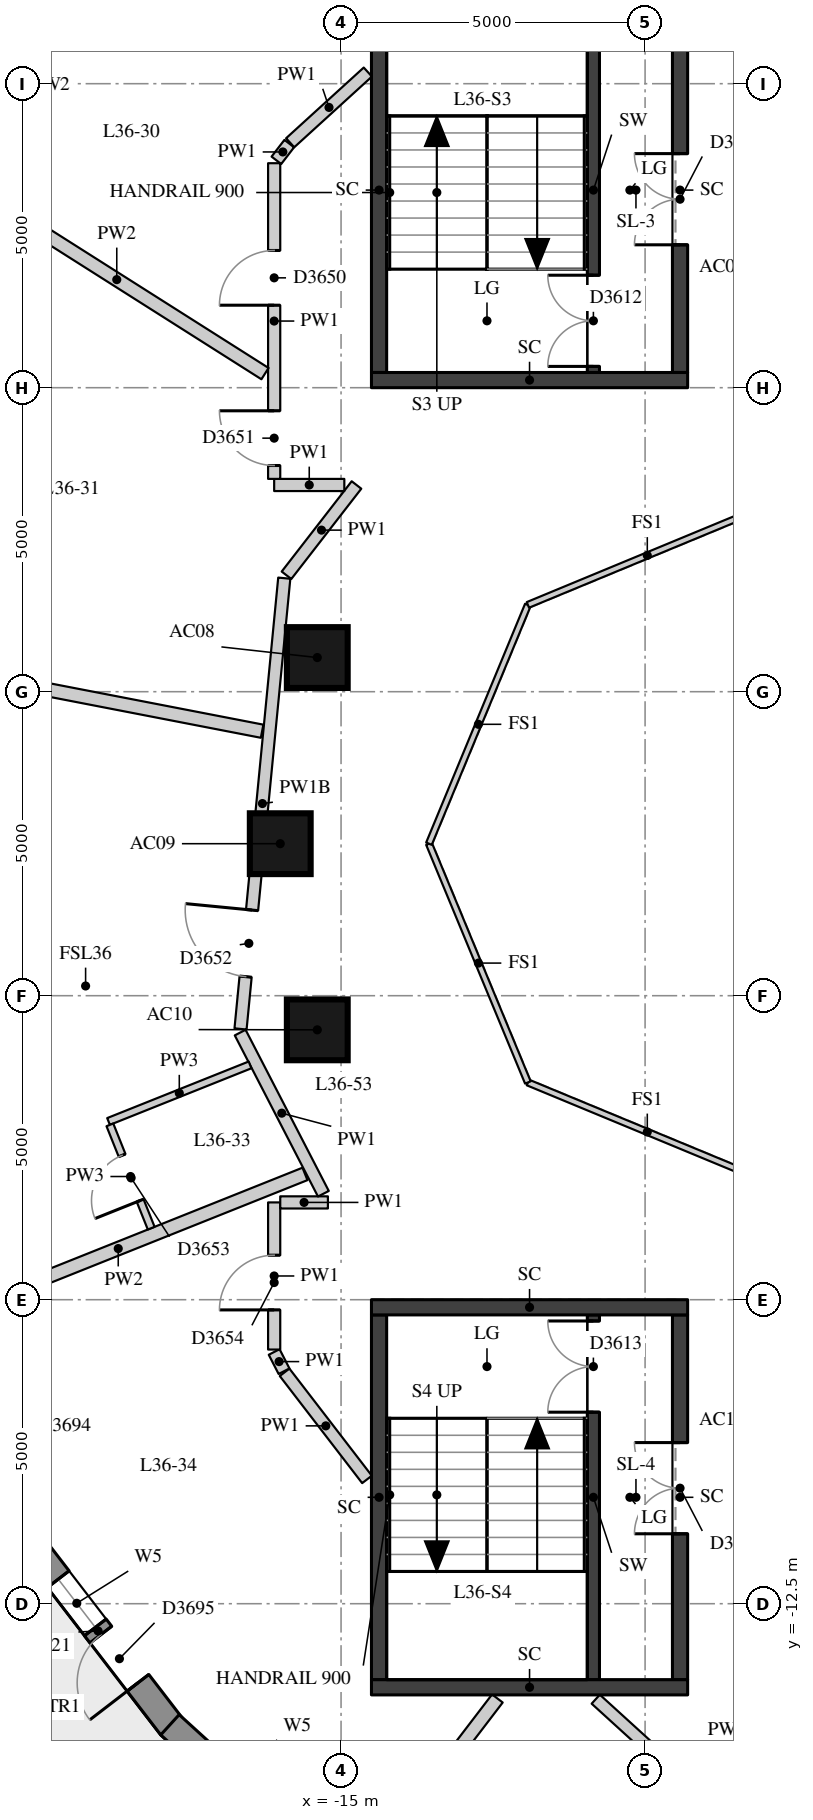
"""IFC4 building model, lengths in metres.
Left out: names, types, materials, properties, quantities, classifications, styles, units other than length and angle.
Written with IfcOpenShell. Run it as: python <this file> out.ifc"""

import sys

from ifc_helpers import new_model, si_unit, direction, frame, frame_2d, origin, origin_2d, place, context, subcontext, project, spatial, rectangle, extrude, element, fill, save


model = new_model("IFC4")
c1 = context("Model", 3, precision=1e-05, world=origin(), true_north=direction((0.0, 1.0)))
c2 = subcontext(c1, "Body", "Model", "MODEL_VIEW")
j1 = project(units=[si_unit("LENGTHUNIT", "METRE"), si_unit("PLANEANGLEUNIT", "RADIAN")], contexts=[c1])
p1 = place(None, origin())
s1 = spatial("IfcSite", under=j1, at=p1, CompositionType="ELEMENT")
p2 = place(p1, origin())
s2 = spatial("IfcBuilding", under=s1, at=p2, CompositionType="ELEMENT")
p3 = place(p2, frame((0.0, 0.0, 128.5)))
s3 = spatial("IfcBuildingStorey", under=s2, at=p3, CompositionType="ELEMENT", Elevation=128.5)
for number, where, z_axis, x_axis in (
    (1, (-15.391, 3.062, 0.0), (0.0, 0.0, 1.0), (1.0, 0.0, 0.0)),
    (2, (-16.0, 0.0, 0.0), (0.0, 0.0, 1.0), (1.0, 0.0, 0.0)),
    (3, (-15.391, -3.062, 0.0), (0.0, 0.0, 1.0), (1.0, 0.0, 0.0)),
):
    element("IfcColumn", number, at=place(p3, frame(where, z_axis=z_axis, x_axis=x_axis)), inside=s3, PredefinedType="COLUMN", context=c2, shape_type="SweptSolid", body=[
        extrude(rectangle(XDim=1.0, YDim=1.0, at=origin_2d()), origin(), (0.0, 0.0, 1.0), 3.3),
    ])
p4 = place(p3, frame((-19.835, 14.575, 0.0), z_axis=(0.0, 0.0, 1.0), x_axis=(-0.610693945156, -0.791866721961, 0.0)))
e4 = element("IfcWall", 4, at=p4, inside=s3, PredefinedType="SOLIDWALL", context=c2, shape_type="SweptSolid", body=[
    extrude(rectangle(XDim=3.395, YDim=0.45, at=frame_2d((1.697, 0.0))), origin(), (0.0, 0.0, 1.0), 3.02),
])
p5 = place(p4, frame((0.697, 0.0, 0.4)))
e5 = element("IfcOpeningElement", 5, at=p5, cuts=e4, PredefinedType="OPENING", context=c2, shape_type="SweptSolid", body=[
    extrude(rectangle(XDim=2.0, YDim=1.75, at=frame_2d((1.0, 0.875))), frame((0.0, 0.235, 0.0), z_axis=(0.0, -1.0, 0.0), x_axis=(1.0, 0.0, 0.0)), (0.0, 0.0, 1.0), 0.47),
])
p6 = place(p3, frame((-20.204, -11.377, 0.0), z_axis=(0.0, 0.0, 1.0), x_axis=(0.609698858135, -0.792633144897, 0.0)))
e6 = element("IfcWall", 6, at=p6, inside=s3, PredefinedType="SOLIDWALL", context=c2, shape_type="SweptSolid", body=[
    extrude(rectangle(XDim=3.965, YDim=0.45, at=frame_2d((1.982, 0.0))), origin(), (0.0, 0.0, 1.0), 3.02),
])
p7 = place(p6, frame((0.907, 0.0, 0.4)))
e7 = element("IfcOpeningElement", 7, at=p7, cuts=e6, PredefinedType="OPENING", context=c2, shape_type="SweptSolid", body=[
    extrude(rectangle(XDim=1.0, YDim=1.75, at=frame_2d((0.5, 0.875))), frame((0.0, 0.235, 0.0), z_axis=(0.0, -1.0, 0.0), x_axis=(1.0, 0.0, 0.0)), (0.0, 0.0, 1.0), 0.47),
])
p8 = place(p6, frame((2.058, 0.0, 0.0)))
e8 = element("IfcOpeningElement", 8, at=p8, cuts=e6, PredefinedType="OPENING", context=c2, shape_type="SweptSolid", body=[
    extrude(rectangle(XDim=1.0, YDim=2.15, at=frame_2d((0.5, 1.075))), frame((0.0, 0.235, 0.0), z_axis=(0.0, -1.0, 0.0), x_axis=(1.0, 0.0, 0.0)), (0.0, 0.0, 1.0), 0.47),
])
p9 = place(p3, frame((-17.814, -14.491, 0.0), z_axis=(0.0, 0.0, 1.0), x_axis=(0.73951517403, -0.673139886933, 0.0)))
e9 = element("IfcWall", 9, at=p9, inside=s3, PredefinedType="SOLIDWALL", context=c2, shape_type="SweptSolid", body=[
    extrude(rectangle(XDim=4.031, YDim=0.45, at=frame_2d((2.016, 0.0))), origin(), (0.0, 0.0, 1.0), 3.02),
])
p10 = place(p9, frame((0.941, 0.0, 0.4)))
e10 = element("IfcOpeningElement", 10, at=p10, cuts=e9, PredefinedType="OPENING", context=c2, shape_type="SweptSolid", body=[
    extrude(rectangle(XDim=1.0, YDim=1.75, at=frame_2d((0.5, 0.875))), frame((0.0, 0.235, 0.0), z_axis=(0.0, -1.0, 0.0), x_axis=(1.0, 0.0, 0.0)), (0.0, 0.0, 1.0), 0.47),
])
p11 = place(p9, frame((2.091, 0.0, 0.0)))
e11 = element("IfcOpeningElement", 11, at=p11, cuts=e9, PredefinedType="OPENING", context=c2, shape_type="SweptSolid", body=[
    extrude(rectangle(XDim=1.0, YDim=2.15, at=frame_2d((0.5, 1.075))), frame((0.0, 0.235, 0.0), z_axis=(0.0, -1.0, 0.0), x_axis=(1.0, 0.0, 0.0)), (0.0, 0.0, 1.0), 0.47),
])
p12 = place(p3, frame((-10.85, 7.75, 0.0), z_axis=(0.0, 0.0, 1.0), x_axis=(0.0, 1.0, 0.0)))
e12 = element("IfcWall", 12, at=p12, inside=s3, PredefinedType="SHEAR", context=c2, shape_type="SweptSolid", body=[
    extrude(rectangle(XDim=6.0, YDim=0.2, at=frame_2d((3.0, 0.0))), origin(), (0.0, 0.0, 1.0), 3.02),
])
p13 = place(p12, frame((0.1, 0.0, 0.0)))
e13 = element("IfcOpeningElement", 13, at=p13, cuts=e12, PredefinedType="OPENING", context=c2, shape_type="SweptSolid", body=[
    extrude(rectangle(XDim=1.5, YDim=2.1, at=frame_2d((0.75, 1.05))), frame((0.0, 0.11, 0.0), z_axis=(0.0, -1.0, 0.0), x_axis=(1.0, 0.0, 0.0)), (0.0, 0.0, 1.0), 0.22),
])
p14 = place(p3, frame((-10.85, -13.75, 0.0), z_axis=(0.0, 0.0, 1.0), x_axis=(0.0, 1.0, 0.0)))
e14 = element("IfcWall", 14, at=p14, inside=s3, PredefinedType="SHEAR", context=c2, shape_type="SweptSolid", body=[
    extrude(rectangle(XDim=6.0, YDim=0.2, at=frame_2d((3.0, 0.0))), origin(), (0.0, 0.0, 1.0), 3.02),
])
p15 = place(p14, frame((4.4, 0.0, 0.0)))
e15 = element("IfcOpeningElement", 15, at=p15, cuts=e14, PredefinedType="OPENING", context=c2, shape_type="SweptSolid", body=[
    extrude(rectangle(XDim=1.5, YDim=2.1, at=frame_2d((0.75, 1.05))), frame((0.0, 0.11, 0.0), z_axis=(0.0, -1.0, 0.0), x_axis=(1.0, 0.0, 0.0)), (0.0, 0.0, 1.0), 0.22),
])
p16 = place(p3, frame((-14.375, 7.75, -0.28), z_axis=(0.0, 0.0, 1.0), x_axis=(0.0, 1.0, 0.0)))
e16 = element("IfcWall", 16, at=p16, inside=s3, PredefinedType="SHEAR", context=c2, shape_type="SweptSolid", body=[
    extrude(rectangle(XDim=6.0, YDim=0.25, at=frame_2d((3.0, 0.0))), origin(), (0.0, 0.0, 1.0), 3.3),
])
p17 = place(p3, frame((-9.425, 7.75, -0.28), z_axis=(0.0, 0.0, 1.0), x_axis=(0.0, 1.0, 0.0)))
e17 = element("IfcWall", 17, at=p17, inside=s3, PredefinedType="SHEAR", context=c2, shape_type="SweptSolid", body=[
    extrude(rectangle(XDim=6.0, YDim=0.25, at=frame_2d((3.0, 0.0))), origin(), (0.0, 0.0, 1.0), 3.3),
])
p18 = place(p17, frame((2.1, 0.0, 0.28)))
e18 = element("IfcOpeningElement", 18, at=p18, cuts=e17, PredefinedType="OPENING", context=c2, shape_type="SweptSolid", body=[
    extrude(rectangle(XDim=1.5, YDim=2.1, at=frame_2d((0.75, 1.05))), frame((0.0, 0.135, 0.0), z_axis=(0.0, -1.0, 0.0), x_axis=(1.0, 0.0, 0.0)), (0.0, 0.0, 1.0), 0.27),
])
p19 = place(p3, frame((-14.5, 7.625, -0.28), z_axis=(0.0, 0.0, 1.0), x_axis=(1.0, 0.0, 0.0)))
e19 = element("IfcWall", 19, at=p19, inside=s3, PredefinedType="SHEAR", context=c2, shape_type="SweptSolid", body=[
    extrude(rectangle(XDim=5.2, YDim=0.25, at=frame_2d((2.6, 0.0))), origin(), (0.0, 0.0, 1.0), 3.3),
])
p20 = place(p3, frame((-14.375, -13.75, -0.28), z_axis=(0.0, 0.0, 1.0), x_axis=(0.0, 1.0, 0.0)))
e20 = element("IfcWall", 20, at=p20, inside=s3, PredefinedType="SHEAR", context=c2, shape_type="SweptSolid", body=[
    extrude(rectangle(XDim=6.0, YDim=0.25, at=frame_2d((3.0, 0.0))), origin(), (0.0, 0.0, 1.0), 3.3),
])
p21 = place(p3, frame((-9.425, -13.75, -0.28), z_axis=(0.0, 0.0, 1.0), x_axis=(0.0, 1.0, 0.0)))
e21 = element("IfcWall", 21, at=p21, inside=s3, PredefinedType="SHEAR", context=c2, shape_type="SweptSolid", body=[
    extrude(rectangle(XDim=6.0, YDim=0.25, at=frame_2d((3.0, 0.0))), origin(), (0.0, 0.0, 1.0), 3.3),
])
p22 = place(p21, frame((2.4, 0.0, 0.28)))
e22 = element("IfcOpeningElement", 22, at=p22, cuts=e21, PredefinedType="OPENING", context=c2, shape_type="SweptSolid", body=[
    extrude(rectangle(XDim=1.5, YDim=2.1, at=frame_2d((0.75, 1.05))), frame((0.0, 0.135, 0.0), z_axis=(0.0, -1.0, 0.0), x_axis=(1.0, 0.0, 0.0)), (0.0, 0.0, 1.0), 0.27),
])
for number, where, z_axis, x_axis in (
    (23, (-14.5, -7.625, -0.28), (0.0, 0.0, 1.0), (1.0, 0.0, 0.0)),
    (24, (-14.5, -13.875, -0.28), (0.0, 0.0, 1.0), (1.0, 0.0, 0.0)),
):
    element("IfcWall", number, at=place(p3, frame(where, z_axis=z_axis, x_axis=x_axis)), inside=s3, PredefinedType="SHEAR", context=c2, shape_type="SweptSolid", body=[
        extrude(rectangle(XDim=5.2, YDim=0.25, at=frame_2d((2.6, 0.0))), origin(), (0.0, 0.0, 1.0), 3.3),
    ])
p23 = place(p3, frame((-14.573, -10.456, 0.0), z_axis=(0.0, 0.0, 1.0), x_axis=(-0.60967360535, 0.792652568872, 0.0)))
e25 = element("IfcWall", 25, at=p23, inside=s3, PredefinedType="PARTITIONING", context=c2, shape_type="SweptSolid", body=[
    extrude(rectangle(XDim=2.223, YDim=0.2, at=frame_2d((1.111, 0.0))), origin(), (0.0, 0.0, 1.0), 3.02),
])
p24 = place(p3, frame((-15.938, -8.676, 0.0), z_axis=(0.0, 0.0, 1.0), x_axis=(-0.456525695549, 0.889710227717, 0.0)))
e26 = element("IfcWall", 26, at=p24, inside=s3, PredefinedType="PARTITIONING", context=c2, shape_type="SweptSolid", body=[
    extrude(rectangle(XDim=0.356, YDim=0.2, at=frame_2d((0.178, 0.0))), origin(), (0.0, 0.0, 1.0), 3.02),
])
p25 = place(p3, frame((-16.1, -8.32, 0.0), z_axis=(0.0, 0.0, 1.0), x_axis=(0.0, 1.0, 0.0)))
e27 = element("IfcWall", 27, at=p25, inside=s3, PredefinedType="PARTITIONING", context=c2, shape_type="SweptSolid", body=[
    extrude(rectangle(XDim=2.42, YDim=0.2, at=frame_2d((1.21, 0.0))), origin(), (0.0, 0.0, 1.0), 3.02),
])
p26 = place(p25, frame((0.652, 0.0, 0.0)))
e28 = element("IfcOpeningElement", 28, at=p26, cuts=e27, PredefinedType="OPENING", context=c2, shape_type="SweptSolid", body=[
    extrude(rectangle(XDim=0.9, YDim=2.1, at=frame_2d((0.45, 1.05))), frame((0.0, 0.11, 0.0), z_axis=(0.0, -1.0, 0.0), x_axis=(1.0, 0.0, 0.0)), (0.0, 0.0, 1.0), 0.22),
])
p27 = place(p3, frame((-16.0, -5.9, 0.0), z_axis=(0.0, 0.0, 1.0), x_axis=(1.0, 0.0, 0.0)))
e29 = element("IfcWall", 29, at=p27, inside=s3, PredefinedType="PARTITIONING", context=c2, shape_type="SweptSolid", body=[
    extrude(rectangle(XDim=0.784, YDim=0.2, at=frame_2d((0.392, 0.0))), origin(), (0.0, 0.0, 1.0), 3.02),
])
p28 = place(p3, frame((-15.291, -5.757, 0.0), z_axis=(0.0, 0.0, 1.0), x_axis=(-0.45873256191, 0.888574384418, 0.0)))
e30 = element("IfcWall", 30, at=p28, inside=s3, PredefinedType="PARTITIONING", context=c2, shape_type="SweptSolid", body=[
    extrude(rectangle(XDim=2.983, YDim=0.2, at=frame_2d((1.491, 0.0))), origin(), (0.0, 0.0, 1.0), 3.02),
])
p29 = place(p3, frame((-16.653, -3.047, 0.0), z_axis=(0.0, 0.0, 1.0), x_axis=(0.096559879606, 0.995327177189, 0.0)))
e31 = element("IfcWall", 31, at=p29, inside=s3, PredefinedType="PARTITIONING", context=c2, shape_type="SweptSolid", body=[
    extrude(rectangle(XDim=7.449, YDim=0.2, at=frame_2d((3.724, 0.0))), origin(), (0.0, 0.0, 1.0), 2.52),
])
p30 = place(p29, frame((0.864, 0.0, 0.0)))
e32 = element("IfcOpeningElement", 32, at=p30, cuts=e31, PredefinedType="OPENING", context=c2, shape_type="SweptSolid", body=[
    extrude(rectangle(XDim=1.1, YDim=2.1, at=frame_2d((0.55, 1.05))), frame((0.0, 0.11, 0.0), z_axis=(0.0, -1.0, 0.0), x_axis=(1.0, 0.0, 0.0)), (0.0, 0.0, 1.0), 0.22),
])
p31 = place(p3, frame((-15.897, 4.415, 0.0), z_axis=(0.0, 0.0, 1.0), x_axis=(0.612626457361, 0.790372585393, 0.0)))
e33 = element("IfcWall", 33, at=p31, inside=s3, PredefinedType="PARTITIONING", context=c2, shape_type="SweptSolid", body=[
    extrude(rectangle(XDim=1.879, YDim=0.2, at=frame_2d((0.939, 0.0))), origin(), (0.0, 0.0, 1.0), 3.02),
])
p32 = place(p3, frame((-14.946, 5.9, 0.0), z_axis=(0.0, 0.0, 1.0), x_axis=(-1.0, 0.0, 0.0)))
e34 = element("IfcWall", 34, at=p32, inside=s3, PredefinedType="PARTITIONING", context=c2, shape_type="SweptSolid", body=[
    extrude(rectangle(XDim=1.154, YDim=0.2, at=frame_2d((0.577, 0.0))), origin(), (0.0, 0.0, 1.0), 3.02),
])
p33 = place(p3, frame((-16.1, 6.0, 0.0), z_axis=(0.0, 0.0, 1.0), x_axis=(0.0, 1.0, 0.0)))
e35 = element("IfcWall", 35, at=p33, inside=s3, PredefinedType="PARTITIONING", context=c2, shape_type="SweptSolid", body=[
    extrude(rectangle(XDim=5.192, YDim=0.2, at=frame_2d((2.596, 0.0))), origin(), (0.0, 0.0, 1.0), 3.02),
])
p34 = place(p33, frame((2.857, 0.0, 0.0)))
e36 = element("IfcOpeningElement", 36, at=p34, cuts=e35, PredefinedType="OPENING", context=c2, shape_type="SweptSolid", body=[
    extrude(rectangle(XDim=0.9, YDim=2.1, at=frame_2d((0.45, 1.05))), frame((0.0, 0.11, 0.0), z_axis=(0.0, -1.0, 0.0), x_axis=(1.0, 0.0, 0.0)), (0.0, 0.0, 1.0), 0.22),
])
p35 = place(p33, frame((0.22, 0.0, 0.0)))
e37 = element("IfcOpeningElement", 37, at=p35, cuts=e35, PredefinedType="OPENING", context=c2, shape_type="SweptSolid", body=[
    extrude(rectangle(XDim=0.9, YDim=2.1, at=frame_2d((0.45, 1.05))), frame((0.0, 0.11, 0.0), z_axis=(0.0, -1.0, 0.0), x_axis=(1.0, 0.0, 0.0)), (0.0, 0.0, 1.0), 0.22),
])
p36 = place(p3, frame((-16.063, 11.24, 0.0), z_axis=(0.0, 0.0, 1.0), x_axis=(0.609744747854, 0.792597844096, 0.0)))
e38 = element("IfcWall", 38, at=p36, inside=s3, PredefinedType="PARTITIONING", context=c2, shape_type="SweptSolid", body=[
    extrude(rectangle(XDim=0.347, YDim=0.2, at=frame_2d((0.174, 0.0))), origin(), (0.0, 0.0, 1.0), 3.02),
])
p37 = place(p3, frame((-15.837, 11.528, 0.0), z_axis=(0.0, 0.0, 1.0), x_axis=(0.739402681643, 0.673263450946, 0.0)))
e39 = element("IfcWall", 39, at=p37, inside=s3, PredefinedType="PARTITIONING", context=c2, shape_type="SweptSolid", body=[
    extrude(rectangle(XDim=1.728, YDim=0.2, at=frame_2d((0.864, 0.0))), origin(), (0.0, 0.0, 1.0), 3.02),
])
p38 = place(p3, frame((-9.176, -15.56, 0.0), z_axis=(0.0, 0.0, 1.0), x_axis=(-0.73943556447, 0.673227336044, 0.0)))
e40 = element("IfcWall", 40, at=p38, inside=s3, PredefinedType="PARTITIONING", context=c2, shape_type="SweptSolid", body=[
    extrude(rectangle(XDim=2.212, YDim=0.2, at=frame_2d((1.106, 0.0))), origin(), (0.0, 0.0, 1.0), 3.02),
])
p39 = place(p3, frame((-21.126, 10.823, 0.0), z_axis=(0.0, 0.0, 1.0), x_axis=(0.844518840625, -0.535525842355, 0.0)))
e41 = element("IfcWall", 41, at=p39, inside=s3, PredefinedType="PARTITIONING", context=c2, shape_type="SweptSolid", body=[
    extrude(rectangle(XDim=5.773, YDim=0.22, at=frame_2d((2.887, 0.0))), origin(), (0.0, 0.0, 1.0), 3.02),
])
p40 = place(p3, frame((-24.118, 3.364, 0.0), z_axis=(0.0, 0.0, 1.0), x_axis=(0.981757892546, -0.190135321348, 0.0)))
e42 = element("IfcWall", 42, at=p40, inside=s3, PredefinedType="PARTITIONING", context=c2, shape_type="SweptSolid", body=[
    extrude(rectangle(XDim=7.965, YDim=0.22, at=frame_2d((3.982, 0.0))), origin(), (0.0, 0.0, 1.0), 2.47),
])
p41 = place(p3, frame((-21.736, -7.887, 0.0), z_axis=(0.0, 0.0, 1.0), x_axis=(0.928547942842, 0.371212496884, 0.0)))
e43 = element("IfcWall", 43, at=p41, inside=s3, PredefinedType="PARTITIONING", context=c2, shape_type="SweptSolid", body=[
    extrude(rectangle(XDim=6.615, YDim=0.22, at=frame_2d((3.308, 0.0))), origin(), (0.0, 0.0, 1.0), 3.02),
])
p42 = place(p3, frame((-14.696, -17.025, 0.0), z_axis=(0.0, 0.0, 1.0), x_axis=(0.607059278405, 0.794656550028, 0.0)))
e44 = element("IfcWall", 44, at=p42, inside=s3, PredefinedType="PARTITIONING", context=c2, shape_type="SweptSolid", body=[
    extrude(rectangle(XDim=3.734, YDim=0.22, at=frame_2d((1.867, 0.0))), origin(), (0.0, 0.0, 1.0), 2.57),
])
p43 = place(p3, frame((-16.497, -3.638, 0.0), z_axis=(0.0, 0.0, 1.0), x_axis=(-0.92857071808, -0.371155522019, 0.0)))
e45 = element("IfcWall", 45, at=p43, inside=s3, PredefinedType="PARTITIONING", context=c2, shape_type="SweptSolid", body=[
    extrude(rectangle(XDim=2.506, YDim=0.12, at=frame_2d((1.253, 0.0))), origin(), (0.0, 0.0, 1.0), 3.02),
])
p44 = place(p3, frame((-18.802, -4.624, 0.0), z_axis=(0.0, 0.0, 1.0), x_axis=(0.371229680537, -0.928541073022, 0.0)))
e46 = element("IfcWall", 46, at=p44, inside=s3, PredefinedType="PARTITIONING", context=c2, shape_type="SweptSolid", body=[
    extrude(rectangle(XDim=1.83, YDim=0.12, at=frame_2d((0.915, 0.0))), origin(), (0.0, 0.0, 1.0), 3.02),
])
p45 = place(p44, frame((0.54, 0.0, 0.0)))
e47 = element("IfcOpeningElement", 47, at=p45, cuts=e46, PredefinedType="OPENING", context=c2, shape_type="SweptSolid", body=[
    extrude(rectangle(XDim=0.8, YDim=2.1, at=frame_2d((0.4, 1.05))), frame((0.0, 0.07, 0.0), z_axis=(0.0, -1.0, 0.0), x_axis=(1.0, 0.0, 0.0)), (0.0, 0.0, 1.0), 0.14),
])
for number, where, z_axis, x_axis in (
    (48, (-8.0, -5.554, 0.0), (0.0, 0.0, 1.0), (-0.924, 0.383, 0.0)),
    (49, (-11.927, -3.927, 0.0), (0.0, 0.0, 1.0), (-0.383, 0.924, 0.0)),
    (50, (-13.554, 0.0, 0.0), (0.0, 0.0, 1.0), (0.383, 0.924, 0.0)),
    (51, (-11.927, 3.927, 0.0), (0.0, 0.0, 1.0), (0.924, 0.383, 0.0)),
):
    element("IfcWall", number, at=place(p3, frame(where, z_axis=z_axis, x_axis=x_axis)), inside=s3, PredefinedType="PARTITIONING", context=c2, shape_type="SweptSolid", body=[
        extrude(rectangle(XDim=4.251, YDim=0.1, at=frame_2d((2.125, 0.0))), origin(), (0.0, 0.0, 1.0), 3.02),
    ])
p46 = place(p7, origin())
e52 = element("IfcWindow", 52, at=p46, inside=s3, PartitioningType="SINGLE_PANEL", PredefinedType="WINDOW", context=c2, shape_type="SweptSolid", body=[
    extrude(rectangle(XDim=1.0, YDim=1.75, at=frame_2d((0.5, 0.875))), frame((0.0, 0.035, 0.0), z_axis=(0.0, -1.0, 0.0), x_axis=(1.0, 0.0, 0.0)), (0.0, 0.0, 1.0), 0.06),
])
fill(e7, e52)
p47 = place(p8, frame((1.0, 0.0, 0.0), z_axis=(0.0, 0.0, 1.0), x_axis=(-1.0, 0.0, 0.0)))
e53 = element("IfcDoor", 53, at=p47, inside=s3, OperationType="SINGLE_SWING_LEFT", PredefinedType="DOOR", context=c2, shape_type="SweptSolid", body=[
    extrude(rectangle(XDim=1.0, YDim=2.15, at=frame_2d((0.5, 1.075))), frame((0.0, 0.075, 0.0), z_axis=(0.0, -1.0, 0.0), x_axis=(1.0, 0.0, 0.0)), (0.0, 0.0, 1.0), 0.05),
])
fill(e8, e53)
p48 = place(p13, origin())
e54 = element("IfcDoor", 54, at=p48, inside=s3, OperationType="DOUBLE_DOOR_SINGLE_SWING", PredefinedType="DOOR", context=c2, shape_type="SweptSolid", body=[
    extrude(rectangle(XDim=1.5, YDim=2.1, at=frame_2d((0.75, 1.05))), frame((0.0, 0.025, 0.0), z_axis=(0.0, -1.0, 0.0), x_axis=(1.0, 0.0, 0.0)), (0.0, 0.0, 1.0), 0.05),
])
fill(e13, e54)
p49 = place(p15, origin())
e55 = element("IfcDoor", 55, at=p49, inside=s3, OperationType="DOUBLE_DOOR_SINGLE_SWING", PredefinedType="DOOR", context=c2, shape_type="SweptSolid", body=[
    extrude(rectangle(XDim=1.5, YDim=2.1, at=frame_2d((0.75, 1.05))), frame((0.0, 0.025, 0.0), z_axis=(0.0, -1.0, 0.0), x_axis=(1.0, 0.0, 0.0)), (0.0, 0.0, 1.0), 0.05),
])
fill(e15, e55)
p50 = place(p18, origin())
e56 = element("IfcDoor", 56, at=p50, inside=s3, OperationType="DOUBLE_DOOR_SINGLE_SWING", PredefinedType="DOOR", context=c2, shape_type="SweptSolid", body=[
    extrude(rectangle(XDim=1.5, YDim=2.1, at=frame_2d((0.75, 1.05))), frame((0.0, 0.025, 0.0), z_axis=(0.0, -1.0, 0.0), x_axis=(1.0, 0.0, 0.0)), (0.0, 0.0, 1.0), 0.05),
])
fill(e18, e56)
p51 = place(p22, origin())
e57 = element("IfcDoor", 57, at=p51, inside=s3, OperationType="DOUBLE_DOOR_SINGLE_SWING", PredefinedType="DOOR", context=c2, shape_type="SweptSolid", body=[
    extrude(rectangle(XDim=1.5, YDim=2.1, at=frame_2d((0.75, 1.05))), frame((0.0, 0.025, 0.0), z_axis=(0.0, -1.0, 0.0), x_axis=(1.0, 0.0, 0.0)), (0.0, 0.0, 1.0), 0.05),
])
fill(e22, e57)
p52 = place(p34, origin())
e58 = element("IfcDoor", 58, at=p52, inside=s3, OperationType="SINGLE_SWING_LEFT", PredefinedType="DOOR", context=c2, shape_type="SweptSolid", body=[
    extrude(rectangle(XDim=0.9, YDim=2.1, at=frame_2d((0.45, 1.05))), frame((0.0, 0.025, 0.0), z_axis=(0.0, -1.0, 0.0), x_axis=(1.0, 0.0, 0.0)), (0.0, 0.0, 1.0), 0.05),
])
fill(e36, e58)
p53 = place(p35, origin())
e59 = element("IfcDoor", 59, at=p53, inside=s3, OperationType="SINGLE_SWING_RIGHT", PredefinedType="DOOR", context=c2, shape_type="SweptSolid", body=[
    extrude(rectangle(XDim=0.9, YDim=2.1, at=frame_2d((0.45, 1.05))), frame((0.0, 0.025, 0.0), z_axis=(0.0, -1.0, 0.0), x_axis=(1.0, 0.0, 0.0)), (0.0, 0.0, 1.0), 0.05),
])
fill(e37, e59)
p54 = place(p30, origin())
e60 = element("IfcDoor", 60, at=p54, inside=s3, OperationType="SINGLE_SWING_RIGHT", PredefinedType="DOOR", context=c2, shape_type="SweptSolid", body=[
    extrude(rectangle(XDim=1.1, YDim=2.1, at=frame_2d((0.55, 1.05))), frame((0.0, 0.025, 0.0), z_axis=(0.0, -1.0, 0.0), x_axis=(1.0, 0.0, 0.0)), (0.0, 0.0, 1.0), 0.05),
])
fill(e32, e60)
p55 = place(p45, origin())
e61 = element("IfcDoor", 61, at=p55, inside=s3, OperationType="SINGLE_SWING_LEFT", PredefinedType="DOOR", context=c2, shape_type="SweptSolid", body=[
    extrude(rectangle(XDim=0.8, YDim=2.1, at=frame_2d((0.4, 1.05))), frame((0.0, 0.025, 0.0), z_axis=(0.0, -1.0, 0.0), x_axis=(1.0, 0.0, 0.0)), (0.0, 0.0, 1.0), 0.05),
])
fill(e47, e61)
p56 = place(p26, origin())
e62 = element("IfcDoor", 62, at=p56, inside=s3, OperationType="SINGLE_SWING_LEFT", PredefinedType="DOOR", context=c2, shape_type="SweptSolid", body=[
    extrude(rectangle(XDim=0.9, YDim=2.1, at=frame_2d((0.45, 1.05))), frame((0.0, 0.025, 0.0), z_axis=(0.0, -1.0, 0.0), x_axis=(1.0, 0.0, 0.0)), (0.0, 0.0, 1.0), 0.05),
])
fill(e28, e62)
save(model, sys.argv[1])
